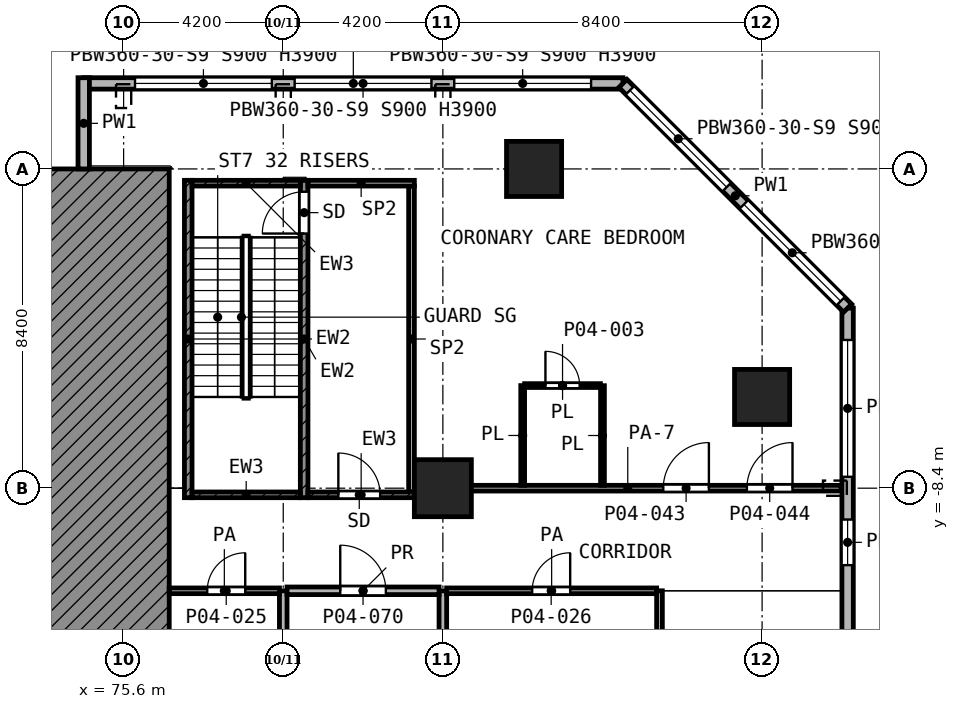
"""IFC4 building model, lengths in metres.
Left out: names, types, materials, properties, quantities, classifications, styles, units other than length and angle.
Written with IfcOpenShell. Run it as: python <this file> out.ifc"""

import sys

from ifc_helpers import new_model, si_unit, direction, frame, frame_2d, origin, origin_2d, place, context, subcontext, project, spatial, polyline, rectangle, outline, extrude, element, fill, save


model = new_model("IFC4")
c1 = context("Model", 3, precision=1e-05, world=origin(), true_north=direction((0.0, 1.0)))
c2 = subcontext(c1, "Body", "Model", "MODEL_VIEW")
j1 = project(units=[si_unit("LENGTHUNIT", "METRE"), si_unit("PLANEANGLEUNIT", "RADIAN")], contexts=[c1])
p1 = place(None, origin())
s1 = spatial("IfcSite", under=j1, at=p1, CompositionType="ELEMENT")
p2 = place(p1, origin())
s2 = spatial("IfcBuilding", under=s1, at=p2, CompositionType="ELEMENT")
p3 = place(p2, frame((0.0, 0.0, 18.2)))
s3 = spatial("IfcBuildingStorey", under=s2, at=p3, CompositionType="ELEMENT", Elevation=18.2)
for number, where, z_axis, x_axis in (
    (1, (86.4, 0.0, 0.0), (0.0, 0.0, 1.0), (1.0, 0.0, 0.0)),
    (2, (92.4, -6.0, 0.0), (0.0, 0.0, 1.0), (1.0, 0.0, 0.0)),
):
    element("IfcColumn", number, at=place(p3, frame(where, z_axis=z_axis, x_axis=x_axis)), inside=s3, PredefinedType="COLUMN", context=c2, shape_type="SweptSolid", body=[
        extrude(rectangle(XDim=1.45, YDim=1.45, at=origin_2d()), origin(), (0.0, 0.0, 1.0), 5.6),
    ])
p4 = place(p3, frame((84.0, -8.4, 0.0), z_axis=(0.0, 0.0, 1.0), x_axis=(1.0, 0.0, 0.0)))
e3 = element("IfcColumn", 3, at=p4, inside=s3, PredefinedType="COLUMN", context=c2, shape_type="SweptSolid", body=[
    extrude(rectangle(XDim=1.5, YDim=1.5, at=origin_2d()), origin(), (0.0, 0.0, 1.0), 5.6),
])
p5 = place(p3, frame((0.0, 0.0, -18.2), z_axis=(0.0, -1.0, 0.0), x_axis=(1.0, 0.0, 0.0)))
e4 = element("IfcWall", 4, at=p5, inside=s3, PredefinedType="SHEAR", context=c2, shape_type="SweptSolid", body=[
    extrude(outline(polyline([(76.8, 23.25), (76.8, 18.2), (71.462, 18.2), (70.576, 19.406), (68.994, 21.022), (67.2, 22.4), (67.2, 23.25), (76.8, 23.25)])), origin(), (0.0, 0.0, 1.0), 33.6),
])
p6 = place(p3, frame((94.65, -29.938, 0.0), z_axis=(0.0, 0.0, 1.0), x_axis=(0.0, 1.0, 0.0)))
e5 = element("IfcWall", 5, at=p6, inside=s3, PredefinedType="SOLIDWALL", context=c2, shape_type="SweptSolid", body=[
    extrude(rectangle(XDim=26.276, YDim=0.3, at=frame_2d((13.138, 0.0))), origin(), (0.0, 0.0, 1.0), 5.05),
])
p7 = place(p6, frame((0.838, 0.0, 0.9)))
e6 = element("IfcOpeningElement", 6, at=p7, cuts=e5, PredefinedType="OPENING", context=c2, shape_type="SweptSolid", body=[
    extrude(rectangle(XDim=3.6, YDim=3.0, at=frame_2d((1.8, 1.5))), frame((0.0, 0.16, 0.0), z_axis=(0.0, -1.0, 0.0), x_axis=(1.0, 0.0, 0.0)), (0.0, 0.0, 1.0), 0.32),
])
p8 = place(p6, frame((5.563, 0.0, 0.9)))
e7 = element("IfcOpeningElement", 7, at=p8, cuts=e5, PredefinedType="OPENING", context=c2, shape_type="SweptSolid", body=[
    extrude(rectangle(XDim=1.2, YDim=3.0, at=frame_2d((0.6, 1.5))), frame((0.0, 0.16, 0.0), z_axis=(0.0, -1.0, 0.0), x_axis=(1.0, 0.0, 0.0)), (0.0, 0.0, 1.0), 0.32),
])
p9 = place(p6, frame((9.238, 0.0, 0.9)))
e8 = element("IfcOpeningElement", 8, at=p9, cuts=e5, PredefinedType="OPENING", context=c2, shape_type="SweptSolid", body=[
    extrude(rectangle(XDim=3.6, YDim=3.0, at=frame_2d((1.8, 1.5))), frame((0.0, 0.16, 0.0), z_axis=(0.0, -1.0, 0.0), x_axis=(1.0, 0.0, 0.0)), (0.0, 0.0, 1.0), 0.32),
])
p10 = place(p6, frame((13.438, 0.0, 0.9)))
e9 = element("IfcOpeningElement", 9, at=p10, cuts=e5, PredefinedType="OPENING", context=c2, shape_type="SweptSolid", body=[
    extrude(rectangle(XDim=3.6, YDim=3.0, at=frame_2d((1.8, 1.5))), frame((0.0, 0.16, 0.0), z_axis=(0.0, -1.0, 0.0), x_axis=(1.0, 0.0, 0.0)), (0.0, 0.0, 1.0), 0.32),
])
p11 = place(p6, frame((19.513, 0.0, 0.9)))
e10 = element("IfcOpeningElement", 10, at=p11, cuts=e5, PredefinedType="OPENING", context=c2, shape_type="SweptSolid", body=[
    extrude(rectangle(XDim=1.2, YDim=3.0, at=frame_2d((0.6, 1.5))), frame((0.0, 0.16, 0.0), z_axis=(0.0, -1.0, 0.0), x_axis=(1.0, 0.0, 0.0)), (0.0, 0.0, 1.0), 0.32),
])
p12 = place(p6, frame((21.838, 0.0, 0.9)))
e11 = element("IfcOpeningElement", 11, at=p12, cuts=e5, PredefinedType="OPENING", context=c2, shape_type="SweptSolid", body=[
    extrude(rectangle(XDim=3.6, YDim=3.0, at=frame_2d((1.8, 1.5))), frame((0.0, 0.16, 0.0), z_axis=(0.0, -1.0, 0.0), x_axis=(1.0, 0.0, 0.0)), (0.0, 0.0, 1.0), 0.32),
])
p13 = place(p3, frame((94.65, -3.662, 0.0), z_axis=(0.0, 0.0, 1.0), x_axis=(-0.707106781187, 0.707106781187, 0.0)))
e12 = element("IfcWall", 12, at=p13, inside=s3, PredefinedType="SOLIDWALL", context=c2, shape_type="SweptSolid", body=[
    extrude(rectangle(XDim=8.361, YDim=0.3, at=frame_2d((4.181, 0.0))), origin(), (0.0, 0.0, 1.0), 5.05),
])
p14 = place(p13, frame((0.259, 0.0, 0.9)))
e13 = element("IfcOpeningElement", 13, at=p14, cuts=e12, PredefinedType="OPENING", context=c2, shape_type="SweptSolid", body=[
    extrude(rectangle(XDim=3.6, YDim=3.0, at=frame_2d((1.8, 1.5))), frame((0.0, 0.16, 0.0), z_axis=(0.0, -1.0, 0.0), x_axis=(1.0, 0.0, 0.0)), (0.0, 0.0, 1.0), 0.32),
])
p15 = place(p13, frame((4.502, 0.0, 0.9)))
e14 = element("IfcOpeningElement", 14, at=p15, cuts=e12, PredefinedType="OPENING", context=c2, shape_type="SweptSolid", body=[
    extrude(rectangle(XDim=3.6, YDim=3.0, at=frame_2d((1.8, 1.5))), frame((0.0, 0.16, 0.0), z_axis=(0.0, -1.0, 0.0), x_axis=(1.0, 0.0, 0.0)), (0.0, 0.0, 1.0), 0.32),
])
p16 = place(p3, frame((88.738, 2.25, 0.0), z_axis=(0.0, 0.0, 1.0), x_axis=(-1.0, 0.0, 0.0)))
e15 = element("IfcWall", 15, at=p16, inside=s3, PredefinedType="SOLIDWALL", context=c2, shape_type="SweptSolid", body=[
    extrude(rectangle(XDim=14.188, YDim=0.3, at=frame_2d((7.094, 0.0))), origin(), (0.0, 0.0, 1.0), 5.05),
])
p17 = place(p16, frame((0.838, 0.0, 0.9)))
e16 = element("IfcOpeningElement", 16, at=p17, cuts=e15, PredefinedType="OPENING", context=c2, shape_type="SweptSolid", body=[
    extrude(rectangle(XDim=3.6, YDim=3.0, at=frame_2d((1.8, 1.5))), frame((0.0, 0.16, 0.0), z_axis=(0.0, -1.0, 0.0), x_axis=(1.0, 0.0, 0.0)), (0.0, 0.0, 1.0), 0.32),
])
p18 = place(p16, frame((5.038, 0.0, 0.9)))
e17 = element("IfcOpeningElement", 17, at=p18, cuts=e15, PredefinedType="OPENING", context=c2, shape_type="SweptSolid", body=[
    extrude(rectangle(XDim=3.6, YDim=3.0, at=frame_2d((1.8, 1.5))), frame((0.0, 0.16, 0.0), z_axis=(0.0, -1.0, 0.0), x_axis=(1.0, 0.0, 0.0)), (0.0, 0.0, 1.0), 0.32),
])
p19 = place(p16, frame((9.238, 0.0, 0.9)))
e18 = element("IfcOpeningElement", 18, at=p19, cuts=e15, PredefinedType="OPENING", context=c2, shape_type="SweptSolid", body=[
    extrude(rectangle(XDim=3.6, YDim=3.0, at=frame_2d((1.8, 1.5))), frame((0.0, 0.16, 0.0), z_axis=(0.0, -1.0, 0.0), x_axis=(1.0, 0.0, 0.0)), (0.0, 0.0, 1.0), 0.32),
])
p20 = place(p3, frame((74.55, 2.4, 0.0), z_axis=(0.0, 0.0, 1.0), x_axis=(0.0, -1.0, 0.0)))
e19 = element("IfcWall", 19, at=p20, inside=s3, PredefinedType="SOLIDWALL", context=c2, shape_type="SweptSolid", body=[
    extrude(rectangle(XDim=2.4, YDim=0.3, at=frame_2d((1.2, 0.0))), origin(), (0.0, 0.0, 1.0), 5.05),
])
p21 = place(p3, frame((77.3, -8.65, 0.0), z_axis=(0.0, 0.0, 1.0), x_axis=(0.0, 1.0, 0.0)))
e20 = element("IfcWall", 20, at=p21, inside=s3, PredefinedType="SHEAR", context=c2, shape_type="SweptSolid", body=[
    extrude(rectangle(XDim=8.35, YDim=0.2, at=frame_2d((4.175, 0.0))), origin(), (0.0, 0.0, 1.0), 5.05),
])
p22 = place(p3, frame((80.35, -8.65, 0.0), z_axis=(0.0, 0.0, 1.0), x_axis=(0.0, 1.0, 0.0)))
e21 = element("IfcWall", 21, at=p22, inside=s3, PredefinedType="SHEAR", context=c2, shape_type="SweptSolid", body=[
    extrude(rectangle(XDim=8.35, YDim=0.2, at=frame_2d((4.175, 0.0))), origin(), (0.0, 0.0, 1.0), 5.05),
])
p23 = place(p22, frame((6.95, 0.0, 0.0)))
e22 = element("IfcOpeningElement", 22, at=p23, cuts=e21, PredefinedType="OPENING", context=c2, shape_type="SweptSolid", body=[
    extrude(rectangle(XDim=1.1, YDim=2.1, at=frame_2d((0.55, 1.05))), frame((0.0, 0.11, 0.0), z_axis=(0.0, -1.0, 0.0), x_axis=(1.0, 0.0, 0.0)), (0.0, 0.0, 1.0), 0.22),
])
p24 = place(p3, frame((77.4, -0.375, 0.0), z_axis=(0.0, 0.0, 1.0), x_axis=(1.0, 0.0, 0.0)))
e23 = element("IfcWall", 23, at=p24, inside=s3, PredefinedType="SHEAR", context=c2, shape_type="SweptSolid", body=[
    extrude(rectangle(XDim=2.85, YDim=0.15, at=frame_2d((1.425, 0.0))), origin(), (0.0, 0.0, 1.0), 5.05),
])
p25 = place(p3, frame((80.45, -0.375, 0.0), z_axis=(0.0, 0.0, 1.0), x_axis=(1.0, 0.0, 0.0)))
e24 = element("IfcWall", 24, at=p25, inside=s3, PredefinedType="PARTITIONING", context=c2, shape_type="SweptSolid", body=[
    extrude(rectangle(XDim=2.8, YDim=0.15, at=frame_2d((1.4, 0.0))), origin(), (0.0, 0.0, 1.0), 5.05),
])
p26 = place(p3, frame((77.4, -8.575, 0.0), z_axis=(0.0, 0.0, 1.0), x_axis=(1.0, 0.0, 0.0)))
e25 = element("IfcWall", 25, at=p26, inside=s3, PredefinedType="SHEAR", context=c2, shape_type="SweptSolid", body=[
    extrude(rectangle(XDim=2.85, YDim=0.15, at=frame_2d((1.425, 0.0))), origin(), (0.0, 0.0, 1.0), 5.05),
])
p27 = place(p3, frame((80.45, -8.575, 0.0), z_axis=(0.0, 0.0, 1.0), x_axis=(1.0, 0.0, 0.0)))
e26 = element("IfcWall", 26, at=p27, inside=s3, PredefinedType="SHEAR", context=c2, shape_type="SweptSolid", body=[
    extrude(rectangle(XDim=2.8, YDim=0.15, at=frame_2d((1.4, 0.0))), origin(), (0.0, 0.0, 1.0), 5.05),
])
p28 = place(p27, frame((0.8, 0.0, 0.0)))
e27 = element("IfcOpeningElement", 27, at=p28, cuts=e26, PredefinedType="OPENING", context=c2, shape_type="SweptSolid", body=[
    extrude(rectangle(XDim=1.1, YDim=2.1, at=frame_2d((0.55, 1.05))), frame((0.0, 0.085, 0.0), z_axis=(0.0, -1.0, 0.0), x_axis=(1.0, 0.0, 0.0)), (0.0, 0.0, 1.0), 0.17),
])
p29 = place(p3, frame((83.175, -8.5, 0.0), z_axis=(0.0, 0.0, 1.0), x_axis=(0.0, 1.0, 0.0)))
e28 = element("IfcWall", 28, at=p29, inside=s3, PredefinedType="PARTITIONING", context=c2, shape_type="SweptSolid", body=[
    extrude(rectangle(XDim=8.05, YDim=0.15, at=frame_2d((4.025, 0.0))), origin(), (0.0, 0.0, 1.0), 5.05),
])
p30 = place(p3, frame((86.152, -5.7, 0.0), z_axis=(0.0, 0.0, 1.0), x_axis=(1.0, 0.0, 0.0)))
e29 = element("IfcWall", 29, at=p30, inside=s3, PredefinedType="PARTITIONING", context=c2, shape_type="SweptSolid", body=[
    extrude(rectangle(XDim=1.995, YDim=0.1, at=frame_2d((0.998, 0.0))), origin(), (0.0, 0.0, 1.0), 5.05),
])
p31 = place(p30, frame((0.547, 0.0, 0.0)))
e30 = element("IfcOpeningElement", 30, at=p31, cuts=e29, PredefinedType="OPENING", context=c2, shape_type="SweptSolid", body=[
    extrude(rectangle(XDim=0.9, YDim=2.1, at=frame_2d((0.45, 1.05))), frame((0.0, 0.06, 0.0), z_axis=(0.0, -1.0, 0.0), x_axis=(1.0, 0.0, 0.0)), (0.0, 0.0, 1.0), 0.12),
])
p32 = place(p3, frame((86.1, -8.325, 0.0), z_axis=(0.0, 0.0, 1.0), x_axis=(0.0, 1.0, 0.0)))
e31 = element("IfcWall", 31, at=p32, inside=s3, PredefinedType="PARTITIONING", context=c2, shape_type="SweptSolid", body=[
    extrude(rectangle(XDim=2.624, YDim=0.1, at=frame_2d((1.312, 0.0))), origin(), (0.0, 0.0, 1.0), 5.05),
])
p33 = place(p3, frame((88.2, -8.325, 0.0), z_axis=(0.0, 0.0, 1.0), x_axis=(0.0, 1.0, 0.0)))
e32 = element("IfcWall", 32, at=p33, inside=s3, PredefinedType="PARTITIONING", context=c2, shape_type="SweptSolid", body=[
    extrude(rectangle(XDim=2.622, YDim=0.1, at=frame_2d((1.311, 0.0))), origin(), (0.0, 0.0, 1.0), 5.05),
])
p34 = place(p3, frame((76.8, -11.1, 0.0), z_axis=(0.0, 0.0, 1.0), x_axis=(1.0, 0.0, 0.0)))
e33 = element("IfcWall", 33, at=p34, inside=s3, PredefinedType="PARTITIONING", context=c2, shape_type="SweptSolid", body=[
    extrude(rectangle(XDim=2.9, YDim=0.15, at=frame_2d((1.45, 0.0))), origin(), (0.0, 0.0, 1.0), 5.05),
])
p35 = place(p34, frame((1.0, 0.0, 0.0)))
e34 = element("IfcOpeningElement", 34, at=p35, cuts=e33, PredefinedType="OPENING", context=c2, shape_type="SweptSolid", body=[
    extrude(rectangle(XDim=1.0, YDim=2.1, at=frame_2d((0.5, 1.05))), frame((0.0, 0.085, 0.0), z_axis=(0.0, -1.0, 0.0), x_axis=(1.0, 0.0, 0.0)), (0.0, 0.0, 1.0), 0.17),
])
p36 = place(p3, frame((84.1, -11.1, 0.0), z_axis=(0.0, 0.0, 1.0), x_axis=(1.0, 0.0, 0.0)))
e35 = element("IfcWall", 35, at=p36, inside=s3, PredefinedType="PARTITIONING", context=c2, shape_type="SweptSolid", body=[
    extrude(rectangle(XDim=5.525, YDim=0.15, at=frame_2d((2.762, 0.0))), origin(), (0.0, 0.0, 1.0), 5.05),
])
p37 = place(p36, frame((2.25, 0.0, 0.0)))
e36 = element("IfcOpeningElement", 36, at=p37, cuts=e35, PredefinedType="OPENING", context=c2, shape_type="SweptSolid", body=[
    extrude(rectangle(XDim=1.0, YDim=2.1, at=frame_2d((0.5, 1.05))), frame((0.0, 0.085, 0.0), z_axis=(0.0, -1.0, 0.0), x_axis=(1.0, 0.0, 0.0)), (0.0, 0.0, 1.0), 0.17),
])
p38 = place(p3, frame((83.25, -8.4, 0.0), z_axis=(0.0, 0.0, 1.0), x_axis=(1.0, 0.0, 0.0)))
e37 = element("IfcWall", 37, at=p38, inside=s3, PredefinedType="PARTITIONING", context=c2, shape_type="SweptSolid", body=[
    extrude(rectangle(XDim=11.23, YDim=0.15, at=frame_2d((5.615, 0.0))), origin(), (0.0, 0.0, 1.0), 3.65),
])
p39 = place(p38, frame((6.55, 0.0, 0.0)))
e38 = element("IfcOpeningElement", 38, at=p39, cuts=e37, PredefinedType="OPENING", context=c2, shape_type="SweptSolid", body=[
    extrude(rectangle(XDim=1.2, YDim=2.1, at=frame_2d((0.6, 1.05))), frame((0.0, 0.085, 0.0), z_axis=(0.0, -1.0, 0.0), x_axis=(1.0, 0.0, 0.0)), (0.0, 0.0, 1.0), 0.17),
])
p40 = place(p38, frame((8.75, 0.0, 0.0)))
e39 = element("IfcOpeningElement", 39, at=p40, cuts=e37, PredefinedType="OPENING", context=c2, shape_type="SweptSolid", body=[
    extrude(rectangle(XDim=1.2, YDim=2.1, at=frame_2d((0.6, 1.05))), frame((0.0, 0.085, 0.0), z_axis=(0.0, -1.0, 0.0), x_axis=(1.0, 0.0, 0.0)), (0.0, 0.0, 1.0), 0.17),
])
p41 = place(p3, frame((89.7, -22.5, 0.0), z_axis=(0.0, 0.0, 1.0), x_axis=(0.0, 1.0, 0.0)))
e40 = element("IfcWall", 40, at=p41, inside=s3, PredefinedType="PARTITIONING", context=c2, shape_type="SweptSolid", body=[
    extrude(rectangle(XDim=11.4, YDim=0.15, at=frame_2d((5.7, 0.0))), origin(), (0.0, 0.0, 1.0), 5.05),
])
p42 = place(p3, frame((79.9, -11.1, 0.0), z_axis=(0.0, 0.0, 1.0), x_axis=(1.0, 0.0, 0.0)))
e41 = element("IfcWall", 41, at=p42, inside=s3, PredefinedType="PARTITIONING", context=c2, shape_type="SweptSolid", body=[
    extrude(rectangle(XDim=4.0, YDim=0.2, at=frame_2d((2.0, 0.0))), origin(), (0.0, 0.0, 1.0), 5.05),
])
p43 = place(p42, frame((1.4, 0.0, 0.0)))
e42 = element("IfcOpeningElement", 42, at=p43, cuts=e41, PredefinedType="OPENING", context=c2, shape_type="SweptSolid", body=[
    extrude(rectangle(XDim=1.2, YDim=2.1, at=frame_2d((0.6, 1.05))), frame((0.0, 0.11, 0.0), z_axis=(0.0, -1.0, 0.0), x_axis=(1.0, 0.0, 0.0)), (0.0, 0.0, 1.0), 0.22),
])
for number, where, z_axis, x_axis in (
    (43, (79.8, -22.5, 0.0), (0.0, 0.0, 1.0), (0.0, 1.0, 0.0)),
    (44, (84.0, -22.5, 0.0), (0.0, 0.0, 1.0), (0.0, 1.0, 0.0)),
):
    element("IfcWall", number, at=place(p3, frame(where, z_axis=z_axis, x_axis=x_axis)), inside=s3, PredefinedType="PARTITIONING", context=c2, shape_type="SweptSolid", body=[
        extrude(rectangle(XDim=11.4, YDim=0.2, at=frame_2d((5.7, 0.0))), origin(), (0.0, 0.0, 1.0), 5.05),
    ])
p44 = place(p11, origin())
e45 = element("IfcWindow", 45, at=p44, inside=s3, PartitioningType="SINGLE_PANEL", PredefinedType="WINDOW", context=c2, shape_type="SweptSolid", body=[
    extrude(rectangle(XDim=1.2, YDim=3.0, at=frame_2d((0.6, 1.5))), frame((0.0, 0.03, 0.0), z_axis=(0.0, -1.0, 0.0), x_axis=(1.0, 0.0, 0.0)), (0.0, 0.0, 1.0), 0.06),
])
fill(e10, e45)
p45 = place(p12, origin())
e46 = element("IfcWindow", 46, at=p45, inside=s3, PartitioningType="SINGLE_PANEL", PredefinedType="WINDOW", context=c2, shape_type="SweptSolid", body=[
    extrude(rectangle(XDim=3.6, YDim=3.0, at=frame_2d((1.8, 1.5))), frame((0.0, 0.03, 0.0), z_axis=(0.0, -1.0, 0.0), x_axis=(1.0, 0.0, 0.0)), (0.0, 0.0, 1.0), 0.06),
])
fill(e11, e46)
p46 = place(p14, origin())
e47 = element("IfcWindow", 47, at=p46, inside=s3, PartitioningType="SINGLE_PANEL", PredefinedType="WINDOW", context=c2, shape_type="SweptSolid", body=[
    extrude(rectangle(XDim=3.6, YDim=3.0, at=frame_2d((1.8, 1.5))), frame((0.0, 0.03, 0.0), z_axis=(0.0, -1.0, 0.0), x_axis=(1.0, 0.0, 0.0)), (0.0, 0.0, 1.0), 0.06),
])
fill(e13, e47)
p47 = place(p15, origin())
e48 = element("IfcWindow", 48, at=p47, inside=s3, PartitioningType="SINGLE_PANEL", PredefinedType="WINDOW", context=c2, shape_type="SweptSolid", body=[
    extrude(rectangle(XDim=3.6, YDim=3.0, at=frame_2d((1.8, 1.5))), frame((0.0, 0.03, 0.0), z_axis=(0.0, -1.0, 0.0), x_axis=(1.0, 0.0, 0.0)), (0.0, 0.0, 1.0), 0.06),
])
fill(e14, e48)
p48 = place(p17, origin())
e49 = element("IfcWindow", 49, at=p48, inside=s3, PartitioningType="SINGLE_PANEL", PredefinedType="WINDOW", context=c2, shape_type="SweptSolid", body=[
    extrude(rectangle(XDim=3.6, YDim=3.0, at=frame_2d((1.8, 1.5))), frame((0.0, 0.03, 0.0), z_axis=(0.0, -1.0, 0.0), x_axis=(1.0, 0.0, 0.0)), (0.0, 0.0, 1.0), 0.06),
])
fill(e16, e49)
p49 = place(p18, origin())
e50 = element("IfcWindow", 50, at=p49, inside=s3, PartitioningType="SINGLE_PANEL", PredefinedType="WINDOW", context=c2, shape_type="SweptSolid", body=[
    extrude(rectangle(XDim=3.6, YDim=3.0, at=frame_2d((1.8, 1.5))), frame((0.0, 0.03, 0.0), z_axis=(0.0, -1.0, 0.0), x_axis=(1.0, 0.0, 0.0)), (0.0, 0.0, 1.0), 0.06),
])
fill(e17, e50)
p50 = place(p19, origin())
e51 = element("IfcWindow", 51, at=p50, inside=s3, PartitioningType="SINGLE_PANEL", PredefinedType="WINDOW", context=c2, shape_type="SweptSolid", body=[
    extrude(rectangle(XDim=3.6, YDim=3.0, at=frame_2d((1.8, 1.5))), frame((0.0, 0.03, 0.0), z_axis=(0.0, -1.0, 0.0), x_axis=(1.0, 0.0, 0.0)), (0.0, 0.0, 1.0), 0.06),
])
fill(e18, e51)
p51 = place(p23, origin())
e52 = element("IfcDoor", 52, at=p51, inside=s3, OperationType="SINGLE_SWING_LEFT", PredefinedType="DOOR", context=c2, shape_type="SweptSolid", body=[
    extrude(rectangle(XDim=1.1, YDim=2.1, at=frame_2d((0.55, 1.05))), frame((0.0, 0.025, 0.0), z_axis=(0.0, -1.0, 0.0), x_axis=(1.0, 0.0, 0.0)), (0.0, 0.0, 1.0), 0.05),
])
fill(e22, e52)
p52 = place(p28, origin())
e53 = element("IfcDoor", 53, at=p52, inside=s3, OperationType="SINGLE_SWING_LEFT", PredefinedType="DOOR", context=c2, shape_type="SweptSolid", body=[
    extrude(rectangle(XDim=1.1, YDim=2.1, at=frame_2d((0.55, 1.05))), frame((0.0, 0.025, 0.0), z_axis=(0.0, -1.0, 0.0), x_axis=(1.0, 0.0, 0.0)), (0.0, 0.0, 1.0), 0.05),
])
fill(e27, e53)
p53 = place(p39, origin())
e54 = element("IfcDoor", 54, at=p53, inside=s3, OperationType="SINGLE_SWING_RIGHT", PredefinedType="DOOR", context=c2, shape_type="SweptSolid", body=[
    extrude(rectangle(XDim=1.2, YDim=2.1, at=frame_2d((0.6, 1.05))), frame((0.0, 0.025, 0.0), z_axis=(0.0, -1.0, 0.0), x_axis=(1.0, 0.0, 0.0)), (0.0, 0.0, 1.0), 0.05),
])
fill(e38, e54)
p54 = place(p40, origin())
e55 = element("IfcDoor", 55, at=p54, inside=s3, OperationType="SINGLE_SWING_RIGHT", PredefinedType="DOOR", context=c2, shape_type="SweptSolid", body=[
    extrude(rectangle(XDim=1.2, YDim=2.1, at=frame_2d((0.6, 1.05))), frame((0.0, 0.025, 0.0), z_axis=(0.0, -1.0, 0.0), x_axis=(1.0, 0.0, 0.0)), (0.0, 0.0, 1.0), 0.05),
])
fill(e39, e55)
p55 = place(p31, origin())
e56 = element("IfcDoor", 56, at=p55, inside=s3, OperationType="SINGLE_SWING_LEFT", PredefinedType="DOOR", context=c2, shape_type="SweptSolid", body=[
    extrude(rectangle(XDim=0.9, YDim=2.1, at=frame_2d((0.45, 1.05))), frame((0.0, 0.025, 0.0), z_axis=(0.0, -1.0, 0.0), x_axis=(1.0, 0.0, 0.0)), (0.0, 0.0, 1.0), 0.05),
])
fill(e30, e56)
p56 = place(p35, origin())
e57 = element("IfcDoor", 57, at=p56, inside=s3, OperationType="SINGLE_SWING_RIGHT", PredefinedType="DOOR", context=c2, shape_type="SweptSolid", body=[
    extrude(rectangle(XDim=1.0, YDim=2.1, at=frame_2d((0.5, 1.05))), frame((0.0, 0.025, 0.0), z_axis=(0.0, -1.0, 0.0), x_axis=(1.0, 0.0, 0.0)), (0.0, 0.0, 1.0), 0.05),
])
fill(e34, e57)
p57 = place(p43, origin())
e58 = element("IfcDoor", 58, at=p57, inside=s3, OperationType="SINGLE_SWING_LEFT", PredefinedType="DOOR", context=c2, shape_type="SweptSolid", body=[
    extrude(rectangle(XDim=1.2, YDim=2.1, at=frame_2d((0.6, 1.05))), frame((0.0, 0.025, 0.0), z_axis=(0.0, -1.0, 0.0), x_axis=(1.0, 0.0, 0.0)), (0.0, 0.0, 1.0), 0.05),
])
fill(e42, e58)
p58 = place(p37, origin())
e59 = element("IfcDoor", 59, at=p58, inside=s3, OperationType="SINGLE_SWING_RIGHT", PredefinedType="DOOR", context=c2, shape_type="SweptSolid", body=[
    extrude(rectangle(XDim=1.0, YDim=2.1, at=frame_2d((0.5, 1.05))), frame((0.0, 0.025, 0.0), z_axis=(0.0, -1.0, 0.0), x_axis=(1.0, 0.0, 0.0)), (0.0, 0.0, 1.0), 0.05),
])
fill(e36, e59)
save(model, sys.argv[1])
